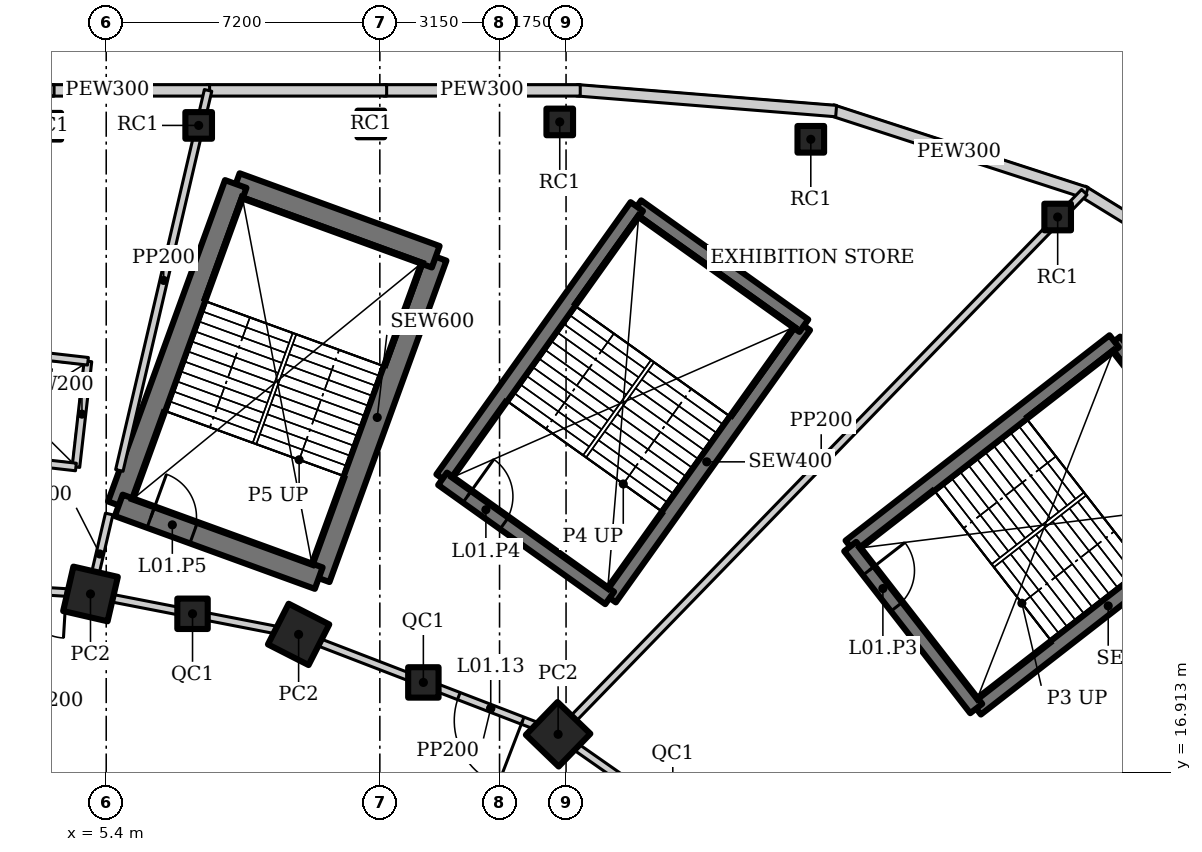
"""IFC4 building model, lengths in metres.
Left out: names, types, materials, properties, quantities, classifications, styles, units other than length and angle.
Written with IfcOpenShell. Run it as: python <this file> out.ifc"""

import sys

from ifc_helpers import new_model, si_unit, direction, frame, frame_2d, origin, origin_2d, place, context, subcontext, project, spatial, rectangle, hollow_rectangle, extrude, element, fill, save


model = new_model("IFC4")
c1 = context("Model", 3, precision=1e-05, world=origin(), true_north=direction((0.0, 1.0)))
c2 = subcontext(c1, "Body", "Model", "MODEL_VIEW")
j1 = project(units=[si_unit("LENGTHUNIT", "METRE"), si_unit("PLANEANGLEUNIT", "RADIAN")], contexts=[c1])
p1 = place(None, origin())
s1 = spatial("IfcSite", under=j1, at=p1, CompositionType="ELEMENT")
p2 = place(p1, origin())
s2 = spatial("IfcBuilding", under=s1, at=p2, CompositionType="ELEMENT")
p3 = place(p2, frame((0.0, 0.0, 6.5)))
s3 = spatial("IfcBuildingStorey", under=s2, at=p3, CompositionType="ELEMENT", Elevation=6.5)
for number, where, z_axis, x_axis in (
    (1, (17.291, 17.905, 0.0), (0.0, 0.0, 1.0), (0.695, 0.719, 0.0)),
    (2, (10.463, 20.534, 0.0), (0.0, 0.0, 1.0), (0.454, 0.891, 0.0)),
    (3, (4.986, 21.598, 0.0), (0.0, 0.0, 1.0), (0.225, 0.974, 0.0)),
):
    element("IfcColumn", number, at=place(p3, frame(where, z_axis=z_axis, x_axis=x_axis)), inside=s3, PredefinedType="COLUMN", context=c2, shape_type="SweptSolid", body=[
        extrude(hollow_rectangle(XDim=1.2, YDim=1.2, WallThickness=0.1, at=origin_2d()), origin(), (0.0, 0.0, 1.0), 8.0),
    ])
for number, where, z_axis, x_axis in (
    (4, (13.745, 19.27, 0.0), (0.0, 0.0, 1.0), (1.0, 0.0, 0.0)),
    (5, (7.671, 21.076, 0.0), (0.0, 0.0, 1.0), (1.0, 0.0, 0.0)),
):
    element("IfcColumn", number, at=place(p3, frame(where, z_axis=z_axis, x_axis=x_axis)), inside=s3, PredefinedType="COLUMN", context=c2, shape_type="SweptSolid", body=[
        extrude(hollow_rectangle(XDim=0.8, YDim=0.8, WallThickness=0.05, at=origin_2d()), origin(), (0.0, 0.0, 1.0), 8.0),
    ])
for number, where, z_axis, x_axis in (
    (6, (23.94, 33.563, 0.0), (0.0, 0.0, 1.0), (1.0, 0.0, 0.0)),
    (7, (12.363, 33.966, 0.0), (0.0, 0.0, 1.0), (1.0, 0.0, 0.0)),
    (8, (3.863, 33.907, 0.0), (0.0, 0.0, 1.0), (1.0, 0.0, 0.0)),
    (9, (30.436, 31.518, 0.0), (0.0, 0.0, 1.0), (1.0, 0.0, 0.0)),
    (10, (17.334, 34.02, 0.0), (0.0, 0.0, 1.0), (1.0, 0.0, 0.0)),
    (11, (7.833, 33.928, 0.0), (0.0, 0.0, 1.0), (1.0, 0.0, 0.0)),
):
    element("IfcColumn", number, at=place(p3, frame(where, z_axis=z_axis, x_axis=x_axis)), inside=s3, PredefinedType="COLUMN", context=c2, shape_type="SweptSolid", body=[
        extrude(hollow_rectangle(XDim=0.7, YDim=0.7, WallThickness=0.04, at=origin_2d()), origin(), (0.0, 0.0, 1.0), 8.0),
    ])
p4 = place(p3, frame((36.932, 28.608, 0.0), z_axis=(0.0, 0.0, 1.0), x_axis=(-0.851808565246, 0.52385319334, 0.0)))
e12 = element("IfcWall", 12, at=p4, inside=s3, PredefinedType="SOLIDWALL", context=c2, shape_type="SweptSolid", body=[
    extrude(rectangle(XDim=6.861, YDim=0.3, at=frame_2d((3.43, 0.0))), origin(), (0.0, 0.0, 1.0), 7.8),
])
p5 = place(p3, frame((31.192, 32.154, 0.0), z_axis=(0.0, 0.0, 1.0), x_axis=(-0.951140010357, 0.308759907853, 0.0)))
e13 = element("IfcWall", 13, at=p5, inside=s3, PredefinedType="SOLIDWALL", context=c2, shape_type="SweptSolid", body=[
    extrude(rectangle(XDim=7.041, YDim=0.3, at=frame_2d((3.521, 0.0))), origin(), (0.0, 0.0, 1.0), 7.8),
])
p6 = place(p3, frame((24.607, 34.306, 0.0), z_axis=(0.0, 0.0, 1.0), x_axis=(-0.996791084449, 0.080047073422, 0.0)))
e14 = element("IfcWall", 14, at=p6, inside=s3, PredefinedType="SOLIDWALL", context=c2, shape_type="SweptSolid", body=[
    extrude(rectangle(XDim=6.847, YDim=0.3, at=frame_2d((3.424, 0.0))), origin(), (0.0, 0.0, 1.0), 7.8),
])
p7 = place(p3, frame((17.873, 34.85, 0.0), z_axis=(0.0, 0.0, 1.0), x_axis=(-1.0, 0.0, 0.0)))
e15 = element("IfcWall", 15, at=p7, inside=s3, PredefinedType="SOLIDWALL", context=c2, shape_type="SweptSolid", body=[
    extrude(rectangle(XDim=5.174, YDim=0.3, at=frame_2d((2.587, 0.0))), origin(), (0.0, 0.0, 1.0), 7.8),
])
p8 = place(p3, frame((12.779, 34.85, 0.0), z_axis=(0.0, 0.0, 1.0), x_axis=(-1.0, 0.0, 0.0)))
e16 = element("IfcWall", 16, at=p8, inside=s3, PredefinedType="SOLIDWALL", context=c2, shape_type="SweptSolid", body=[
    extrude(rectangle(XDim=4.739, YDim=0.3, at=frame_2d((2.369, 0.0))), origin(), (0.0, 0.0, 1.0), 7.8),
])
p9 = place(p3, frame((8.12, 34.85, 0.0), z_axis=(0.0, 0.0, 1.0), x_axis=(-1.0, 0.0, 0.0)))
e17 = element("IfcWall", 17, at=p9, inside=s3, PredefinedType="SOLIDWALL", context=c2, shape_type="SweptSolid", body=[
    extrude(rectangle(XDim=4.173, YDim=0.3, at=frame_2d((2.086, 0.0))), origin(), (0.0, 0.0, 1.0), 7.8),
])
p10 = place(p3, frame((4.028, 34.85, 0.0), z_axis=(0.0, 0.0, 1.0), x_axis=(-1.0, 0.0, 0.0)))
e18 = element("IfcWall", 18, at=p10, inside=s3, PredefinedType="SOLIDWALL", context=c2, shape_type="SweptSolid", body=[
    extrude(rectangle(XDim=4.068, YDim=0.3, at=frame_2d((2.034, 0.0))), origin(), (0.0, 0.0, 1.0), 7.8),
])
p11 = place(p3, frame((20.309, 15.794, 0.0), z_axis=(0.0, 0.0, 1.0), x_axis=(-0.819409395821, 0.573208724672, 0.0)))
e19 = element("IfcWall", 19, at=p11, inside=s3, PredefinedType="SOLIDWALL", context=c2, shape_type="SweptSolid", body=[
    extrude(rectangle(XDim=3.683, YDim=0.2, at=frame_2d((1.841, 0.0))), origin(), (0.0, 0.0, 1.0), 7.396),
])
p12 = place(p3, frame((17.291, 17.905, 0.0), z_axis=(0.0, 0.0, 1.0), x_axis=(-0.933224646415, 0.359293416754, 0.0)))
e20 = element("IfcWall", 20, at=p12, inside=s3, PredefinedType="SOLIDWALL", context=c2, shape_type="SweptSolid", body=[
    extrude(rectangle(XDim=3.799, YDim=0.2, at=frame_2d((1.899, 0.0))), origin(), (0.0, 0.0, 1.0), 7.274),
])
p13 = place(p12, frame((1.0, 0.0, 0.0)))
e21 = element("IfcOpeningElement", 21, at=p13, cuts=e20, PredefinedType="OPENING", context=c2, shape_type="SweptSolid", body=[
    extrude(rectangle(XDim=1.8, YDim=2.4, at=frame_2d((0.9, 1.2))), frame((0.0, 0.11, 0.0), z_axis=(0.0, -1.0, 0.0), x_axis=(1.0, 0.0, 0.0)), (0.0, 0.0, 1.0), 0.22),
])
p14 = place(p3, frame((13.745, 19.27, 0.0), z_axis=(0.0, 0.0, 1.0), x_axis=(-0.933241815012, 0.359248820058, 0.0)))
e22 = element("IfcWall", 22, at=p14, inside=s3, PredefinedType="SOLIDWALL", context=c2, shape_type="SweptSolid", body=[
    extrude(rectangle(XDim=3.518, YDim=0.2, at=frame_2d((1.759, 0.0))), origin(), (0.0, 0.0, 1.0), 7.396),
])
p15 = place(p3, frame((10.463, 20.534, 0.0), z_axis=(0.0, 0.0, 1.0), x_axis=(-0.98163593748, 0.190763954266, 0.0)))
e23 = element("IfcWall", 23, at=p15, inside=s3, PredefinedType="SOLIDWALL", context=c2, shape_type="SweptSolid", body=[
    extrude(rectangle(XDim=2.844, YDim=0.2, at=frame_2d((1.422, 0.0))), origin(), (0.0, 0.0, 1.0), 7.396),
])
p16 = place(p3, frame((7.671, 21.076, 0.0), z_axis=(0.0, 0.0, 1.0), x_axis=(-0.981637218105, 0.190757364289, 0.0)))
e24 = element("IfcWall", 24, at=p16, inside=s3, PredefinedType="SOLIDWALL", context=c2, shape_type="SweptSolid", body=[
    extrude(rectangle(XDim=2.735, YDim=0.2, at=frame_2d((1.368, 0.0))), origin(), (0.0, 0.0, 1.0), 7.396),
])
p17 = place(p3, frame((4.986, 21.598, 0.0), z_axis=(0.0, 0.0, 1.0), x_axis=(-0.998172405641, 0.060430527186, 0.0)))
e25 = element("IfcWall", 25, at=p17, inside=s3, PredefinedType="SOLIDWALL", context=c2, shape_type="SweptSolid", body=[
    extrude(rectangle(XDim=2.513, YDim=0.2, at=frame_2d((1.256, 0.0))), origin(), (0.0, 0.0, 1.0), 7.396),
])
p18 = place(p17, frame((0.64, 0.0, 0.0)))
e26 = element("IfcOpeningElement", 26, at=p18, cuts=e25, PredefinedType="OPENING", context=c2, shape_type="SweptSolid", body=[
    extrude(rectangle(XDim=1.2, YDim=2.4, at=frame_2d((0.6, 1.2))), frame((0.0, 0.11, 0.0), z_axis=(0.0, -1.0, 0.0), x_axis=(1.0, 0.0, 0.0)), (0.0, 0.0, 1.0), 0.22),
])
p19 = place(p3, frame((17.291, 17.905, 0.0), z_axis=(0.0, 0.0, 1.0), x_axis=(0.696460684513, 0.717594951855, 0.0)))
e27 = element("IfcWall", 27, at=p19, inside=s3, PredefinedType="SOLIDWALL", context=c2, shape_type="SweptSolid", body=[
    extrude(rectangle(XDim=19.881, YDim=0.2, at=frame_2d((9.94, 0.0))), origin(), (0.0, 0.0, 1.0), 6.3),
])
p20 = place(p3, frame((4.986, 21.598, 0.0), z_axis=(0.0, 0.0, 1.0), x_axis=(0.227351065365, 0.973812863479, 0.0)))
e28 = element("IfcWall", 28, at=p20, inside=s3, PredefinedType="SOLIDWALL", context=c2, shape_type="SweptSolid", body=[
    extrude(rectangle(XDim=2.161, YDim=0.2, at=frame_2d((1.08, 0.0))), origin(), (0.0, 0.0, 1.0), 6.3),
])
p21 = place(p3, frame((5.745, 24.849, 0.0), z_axis=(0.0, 0.0, 1.0), x_axis=(0.227353607936, 0.973812269875, 0.0)))
e29 = element("IfcWall", 29, at=p21, inside=s3, PredefinedType="SOLIDWALL", context=c2, shape_type="SweptSolid", body=[
    extrude(rectangle(XDim=10.27, YDim=0.2, at=frame_2d((5.135, 0.0))), origin(), (0.0, 0.0, 1.0), 6.3),
])
p22 = place(p3, frame((28.293, 18.583, 0.0), z_axis=(0.0, 0.0, 1.0), x_axis=(0.78938060008, 0.613904119726, 0.0)))
e30 = element("IfcWall", 30, at=p22, inside=s3, PredefinedType="SHEAR", context=c2, shape_type="SweptSolid", body=[
    extrude(rectangle(XDim=8.8, YDim=0.4, at=frame_2d((4.4, 0.0))), origin(), (0.0, 0.0, 1.0), 8.0),
])
p23 = place(p3, frame((35.239, 23.985, 0.0), z_axis=(0.0, 0.0, 1.0), x_axis=(-0.613912443548, 0.789374126544, 0.0)))
e31 = element("IfcWall", 31, at=p23, inside=s3, PredefinedType="SHEAR", context=c2, shape_type="SweptSolid", body=[
    extrude(rectangle(XDim=5.4, YDim=0.4, at=frame_2d((2.7, 0.0))), origin(), (0.0, 0.0, 1.0), 8.0),
])
p24 = place(p3, frame((31.924, 28.248, 0.0), z_axis=(0.0, 0.0, 1.0), x_axis=(-0.78938060008, -0.613904119726, 0.0)))
e32 = element("IfcWall", 32, at=p24, inside=s3, PredefinedType="SHEAR", context=c2, shape_type="SweptSolid", body=[
    extrude(rectangle(XDim=8.8, YDim=0.4, at=frame_2d((4.4, 0.0))), origin(), (0.0, 0.0, 1.0), 8.0),
])
p25 = place(p3, frame((24.978, 22.846, 0.0), z_axis=(0.0, 0.0, 1.0), x_axis=(0.613912443548, -0.789374126544, 0.0)))
e33 = element("IfcWall", 33, at=p25, inside=s3, PredefinedType="SHEAR", context=c2, shape_type="SweptSolid", body=[
    extrude(rectangle(XDim=5.4, YDim=0.4, at=frame_2d((2.7, 0.0))), origin(), (0.0, 0.0, 1.0), 8.0),
])
p26 = place(p25, frame((0.8, 0.0, 0.0)))
e34 = element("IfcOpeningElement", 34, at=p26, cuts=e33, PredefinedType="OPENING", context=c2, shape_type="SweptSolid", body=[
    extrude(rectangle(XDim=1.2, YDim=2.1, at=frame_2d((0.6, 1.05))), frame((0.0, 0.21, 0.0), z_axis=(0.0, -1.0, 0.0), x_axis=(1.0, 0.0, 0.0)), (0.0, 0.0, 1.0), 0.42),
])
p27 = place(p3, frame((18.647, 21.493, 0.0), z_axis=(0.0, 0.0, 1.0), x_axis=(0.580705313356, 0.814113836659, 0.0)))
e35 = element("IfcWall", 35, at=p27, inside=s3, PredefinedType="SHEAR", context=c2, shape_type="SweptSolid", body=[
    extrude(rectangle(XDim=8.8, YDim=0.4, at=frame_2d((4.4, 0.0))), origin(), (0.0, 0.0, 1.0), 8.0),
])
p28 = place(p3, frame((23.757, 28.657, 0.0), z_axis=(0.0, 0.0, 1.0), x_axis=(-0.814121252423, 0.580694916762, 0.0)))
e36 = element("IfcWall", 36, at=p28, inside=s3, PredefinedType="SHEAR", context=c2, shape_type="SweptSolid", body=[
    extrude(rectangle(XDim=5.4, YDim=0.4, at=frame_2d((2.7, 0.0))), origin(), (0.0, 0.0, 1.0), 8.0),
])
p29 = place(p3, frame((19.361, 31.793, 0.0), z_axis=(0.0, 0.0, 1.0), x_axis=(-0.580705313356, -0.814113836659, 0.0)))
e37 = element("IfcWall", 37, at=p29, inside=s3, PredefinedType="SHEAR", context=c2, shape_type="SweptSolid", body=[
    extrude(rectangle(XDim=8.8, YDim=0.4, at=frame_2d((4.4, 0.0))), origin(), (0.0, 0.0, 1.0), 8.0),
])
p30 = place(p3, frame((14.251, 24.629, 0.0), z_axis=(0.0, 0.0, 1.0), x_axis=(0.814121252423, -0.580694916762, 0.0)))
e38 = element("IfcWall", 38, at=p30, inside=s3, PredefinedType="SHEAR", context=c2, shape_type="SweptSolid", body=[
    extrude(rectangle(XDim=5.4, YDim=0.4, at=frame_2d((2.7, 0.0))), origin(), (0.0, 0.0, 1.0), 8.0),
])
p31 = place(p30, frame((0.8, 0.0, 0.0)))
e39 = element("IfcOpeningElement", 39, at=p31, cuts=e38, PredefinedType="OPENING", context=c2, shape_type="SweptSolid", body=[
    extrude(rectangle(XDim=1.2, YDim=2.1, at=frame_2d((0.6, 1.05))), frame((0.0, 0.21, 0.0), z_axis=(0.0, -1.0, 0.0), x_axis=(1.0, 0.0, 0.0)), (0.0, 0.0, 1.0), 0.42),
])
p32 = place(p3, frame((10.992, 22.014, 0.0), z_axis=(0.0, 0.0, 1.0), x_axis=(0.342013127703, 0.939695174234, 0.0)))
e40 = element("IfcWall", 40, at=p32, inside=s3, PredefinedType="SHEAR", context=c2, shape_type="SweptSolid", body=[
    extrude(rectangle(XDim=9.0, YDim=0.6, at=frame_2d((4.5, 0.0))), origin(), (0.0, 0.0, 1.0), 8.0),
])
p33 = place(p3, frame((14.07, 30.471, 0.0), z_axis=(0.0, 0.0, 1.0), x_axis=(-0.939692822968, 0.342019587834, 0.0)))
e41 = element("IfcWall", 41, at=p33, inside=s3, PredefinedType="SHEAR", context=c2, shape_type="SweptSolid", body=[
    extrude(rectangle(XDim=5.6, YDim=0.6, at=frame_2d((2.8, 0.0))), origin(), (0.0, 0.0, 1.0), 8.0),
])
p34 = place(p3, frame((8.808, 32.387, 0.0), z_axis=(0.0, 0.0, 1.0), x_axis=(-0.3420218461, -0.939692001025, 0.0)))
e42 = element("IfcWall", 42, at=p34, inside=s3, PredefinedType="SHEAR", context=c2, shape_type="SweptSolid", body=[
    extrude(rectangle(XDim=9.0, YDim=0.6, at=frame_2d((4.5, 0.0))), origin(), (0.0, 0.0, 1.0), 8.0),
])
p35 = place(p3, frame((5.73, 23.93, 0.0), z_axis=(0.0, 0.0, 1.0), x_axis=(0.939678810556, -0.342058084236, 0.0)))
e43 = element("IfcWall", 43, at=p35, inside=s3, PredefinedType="SHEAR", context=c2, shape_type="SweptSolid", body=[
    extrude(rectangle(XDim=5.6, YDim=0.6, at=frame_2d((2.8, 0.0))), origin(), (0.0, 0.0, 1.0), 8.0),
])
p36 = place(p35, frame((0.9, 0.0, 0.0)))
e44 = element("IfcOpeningElement", 44, at=p36, cuts=e43, PredefinedType="OPENING", context=c2, shape_type="SweptSolid", body=[
    extrude(rectangle(XDim=1.2, YDim=2.1, at=frame_2d((0.6, 1.05))), frame((0.0, 0.31, 0.0), z_axis=(0.0, -1.0, 0.0), x_axis=(1.0, 0.0, 0.0)), (0.0, 0.0, 1.0), 0.62),
])
p37 = place(p3, frame((4.603, 24.939, 0.0), z_axis=(0.0, 0.0, 1.0), x_axis=(0.113177712989, 0.993574760792, 0.0)))
e45 = element("IfcWall", 45, at=p37, inside=s3, PredefinedType="SOLIDWALL", context=c2, shape_type="SweptSolid", body=[
    extrude(rectangle(XDim=2.8, YDim=0.2, at=frame_2d((1.4, 0.0))), origin(), (0.0, 0.0, 1.0), 7.8),
])
p38 = place(p3, frame((4.92, 27.721, 0.0), z_axis=(0.0, 0.0, 1.0), x_axis=(-0.993571061716, 0.113210182053, 0.0)))
e46 = element("IfcWall", 46, at=p38, inside=s3, PredefinedType="SOLIDWALL", context=c2, shape_type="SweptSolid", body=[
    extrude(rectangle(XDim=3.5, YDim=0.2, at=frame_2d((1.75, 0.0))), origin(), (0.0, 0.0, 1.0), 6.3),
])
p39 = place(p3, frame((1.125, 25.335, 0.0), z_axis=(0.0, 0.0, 1.0), x_axis=(0.993571061716, -0.113210182053, 0.0)))
e47 = element("IfcWall", 47, at=p39, inside=s3, PredefinedType="SOLIDWALL", context=c2, shape_type="SweptSolid", body=[
    extrude(rectangle(XDim=3.5, YDim=0.2, at=frame_2d((1.75, 0.0))), origin(), (0.0, 0.0, 1.0), 6.3),
])
p40 = place(p39, frame((1.2, 0.0, 0.0)))
e48 = element("IfcOpeningElement", 48, at=p40, cuts=e47, PredefinedType="OPENING", context=c2, shape_type="SweptSolid", body=[
    extrude(rectangle(XDim=1.1, YDim=2.2, at=frame_2d((0.55, 1.1))), frame((0.0, 0.11, 0.0), z_axis=(0.0, -1.0, 0.0), x_axis=(1.0, 0.0, 0.0)), (0.0, 0.0, 1.0), 0.22),
])
p41 = place(p13, origin())
e49 = element("IfcDoor", 49, at=p41, inside=s3, OperationType="DOUBLE_DOOR_DOUBLE_SWING", PredefinedType="DOOR", context=c2, shape_type="SweptSolid", body=[
    extrude(rectangle(XDim=1.8, YDim=2.4, at=frame_2d((0.9, 1.2))), frame((0.0, 0.025, 0.0), z_axis=(0.0, -1.0, 0.0), x_axis=(1.0, 0.0, 0.0)), (0.0, 0.0, 1.0), 0.05),
])
fill(e21, e49)
p42 = place(p18, origin())
e50 = element("IfcDoor", 50, at=p42, inside=s3, OperationType="SINGLE_SWING_RIGHT", PredefinedType="DOOR", context=c2, shape_type="SweptSolid", body=[
    extrude(rectangle(XDim=1.2, YDim=2.4, at=frame_2d((0.6, 1.2))), frame((0.0, 0.025, 0.0), z_axis=(0.0, -1.0, 0.0), x_axis=(1.0, 0.0, 0.0)), (0.0, 0.0, 1.0), 0.05),
])
fill(e26, e50)
p43 = place(p26, origin())
e51 = element("IfcDoor", 51, at=p43, inside=s3, OperationType="SINGLE_SWING_RIGHT", PredefinedType="DOOR", context=c2, shape_type="SweptSolid", body=[
    extrude(rectangle(XDim=1.2, YDim=2.1, at=frame_2d((0.6, 1.05))), frame((0.0, 0.025, 0.0), z_axis=(0.0, -1.0, 0.0), x_axis=(1.0, 0.0, 0.0)), (0.0, 0.0, 1.0), 0.05),
])
fill(e34, e51)
p44 = place(p31, origin())
e52 = element("IfcDoor", 52, at=p44, inside=s3, OperationType="SINGLE_SWING_RIGHT", PredefinedType="DOOR", context=c2, shape_type="SweptSolid", body=[
    extrude(rectangle(XDim=1.2, YDim=2.1, at=frame_2d((0.6, 1.05))), frame((0.0, 0.025, 0.0), z_axis=(0.0, -1.0, 0.0), x_axis=(1.0, 0.0, 0.0)), (0.0, 0.0, 1.0), 0.05),
])
fill(e39, e52)
p45 = place(p36, origin())
e53 = element("IfcDoor", 53, at=p45, inside=s3, OperationType="SINGLE_SWING_RIGHT", PredefinedType="DOOR", context=c2, shape_type="SweptSolid", body=[
    extrude(rectangle(XDim=1.2, YDim=2.1, at=frame_2d((0.6, 1.05))), frame((0.0, 0.025, 0.0), z_axis=(0.0, -1.0, 0.0), x_axis=(1.0, 0.0, 0.0)), (0.0, 0.0, 1.0), 0.05),
])
fill(e44, e53)
save(model, sys.argv[1])
